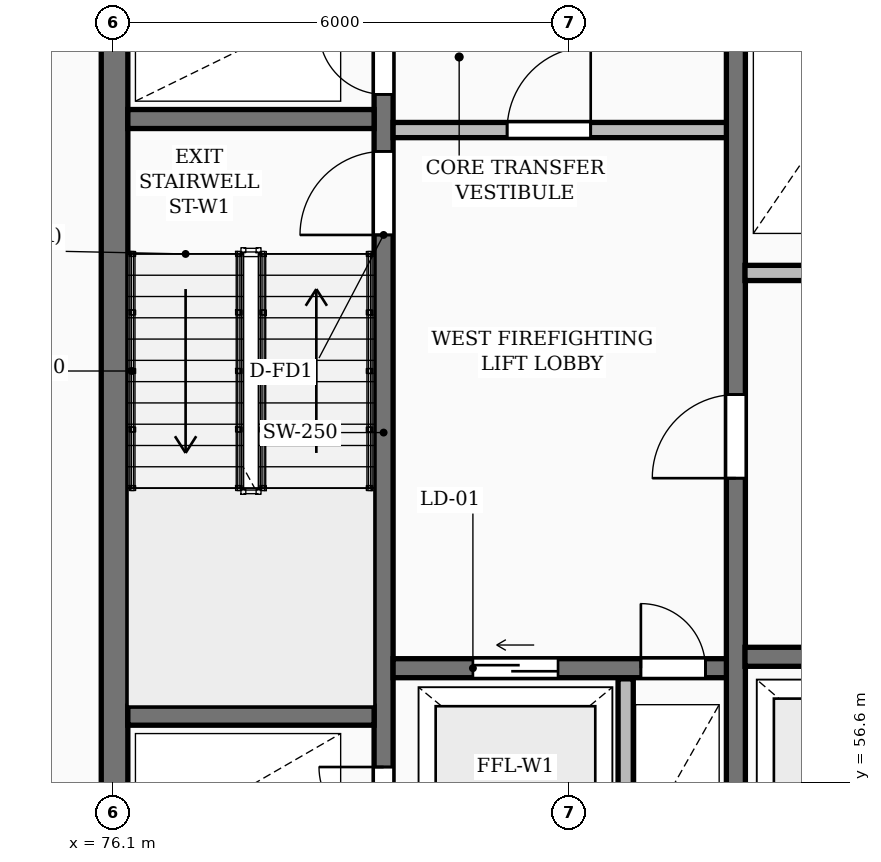
"""IFC4 building model, lengths in metres.
Left out: names, types, materials, properties, quantities, classifications, styles, units other than length and angle.
Written with IfcOpenShell. Run it as: python <this file> out.ifc"""

import sys

from ifc_helpers import new_model, si_unit, direction, frame, frame_2d, origin, place, context, subcontext, project, spatial, rectangle, extrude, element, fill, save


model = new_model("IFC4")
c1 = context("Model", 3, precision=1e-05, world=origin(), true_north=direction((0.0, 1.0)))
c2 = subcontext(c1, "Body", "Model", "MODEL_VIEW")
j1 = project(units=[si_unit("LENGTHUNIT", "METRE"), si_unit("PLANEANGLEUNIT", "RADIAN")], contexts=[c1])
p1 = place(None, origin())
s1 = spatial("IfcSite", under=j1, at=p1, CompositionType="ELEMENT")
p2 = place(p1, origin())
s2 = spatial("IfcBuilding", under=s1, at=p2, CompositionType="ELEMENT")
p3 = place(p2, frame((0.0, 0.0, 10.0)))
s3 = spatial("IfcBuildingStorey", under=s2, at=p3, CompositionType="ELEMENT", Elevation=10.0)
p4 = place(p3, frame((76.125, 55.375, 0.0), z_axis=(0.0, 0.0, 1.0), x_axis=(0.0, 1.0, 0.0)))
e1 = element("IfcWall", 1, at=p4, inside=s3, PredefinedType="SHEAR", context=c2, shape_type="SweptSolid", body=[
    extrude(rectangle(XDim=11.65, YDim=0.35, at=frame_2d((5.825, 0.0))), origin(), (0.0, 0.0, 1.0), 4.5),
])
p5 = place(p3, frame((79.665, 55.4, 0.0), z_axis=(0.0, 0.0, 1.0), x_axis=(0.0, 1.0, 0.0)))
e2 = element("IfcWall", 2, at=p5, inside=s3, PredefinedType="SHEAR", context=c2, shape_type="SweptSolid", body=[
    extrude(rectangle(XDim=11.6, YDim=0.25, at=frame_2d((5.8, 0.0))), origin(), (0.0, 0.0, 1.0), 4.5),
])
p6 = place(p5, frame((0.55, 0.0, 0.0)))
e3 = element("IfcOpeningElement", 3, at=p6, cuts=e2, PredefinedType="OPENING", context=c2, shape_type="SweptSolid", body=[
    extrude(rectangle(XDim=0.85, YDim=2.05, at=frame_2d((0.425, 1.025))), frame((0.0, 0.135, 0.0), z_axis=(0.0, -1.0, 0.0), x_axis=(1.0, 0.0, 0.0)), (0.0, 0.0, 1.0), 0.27),
])
p7 = place(p5, frame((8.4, 0.0, 0.0)))
e4 = element("IfcOpeningElement", 4, at=p7, cuts=e2, PredefinedType="OPENING", context=c2, shape_type="SweptSolid", body=[
    extrude(rectangle(XDim=1.1, YDim=2.1, at=frame_2d((0.55, 1.05))), frame((0.0, 0.135, 0.0), z_axis=(0.0, -1.0, 0.0), x_axis=(1.0, 0.0, 0.0)), (0.0, 0.0, 1.0), 0.27),
])
p8 = place(p5, frame((10.25, 0.0, 0.0)))
e5 = element("IfcOpeningElement", 5, at=p8, cuts=e2, PredefinedType="OPENING", context=c2, shape_type="SweptSolid", body=[
    extrude(rectangle(XDim=0.85, YDim=2.05, at=frame_2d((0.425, 1.025))), frame((0.0, 0.135, 0.0), z_axis=(0.0, -1.0, 0.0), x_axis=(1.0, 0.0, 0.0)), (0.0, 0.0, 1.0), 0.27),
])
for number, where, z_axis, x_axis in (
    (6, (76.3, 57.475, 0.0), (0.0, 0.0, 1.0), (1.0, 0.0, 0.0)),
    (7, (76.3, 65.325, 0.0), (0.0, 0.0, 1.0), (1.0, 0.0, 0.0)),
):
    element("IfcWall", number, at=place(p3, frame(where, z_axis=z_axis, x_axis=x_axis)), inside=s3, PredefinedType="SHEAR", context=c2, shape_type="SweptSolid", body=[
        extrude(rectangle(XDim=3.24, YDim=0.25, at=frame_2d((1.62, 0.0))), origin(), (0.0, 0.0, 1.0), 4.5),
    ])
p9 = place(p3, frame((79.79, 58.1, 0.0), z_axis=(0.0, 0.0, 1.0), x_axis=(1.0, 0.0, 0.0)))
e8 = element("IfcWall", 8, at=p9, inside=s3, PredefinedType="SHEAR", context=c2, shape_type="SweptSolid", body=[
    extrude(rectangle(XDim=4.39, YDim=0.25, at=frame_2d((2.195, 0.0))), origin(), (0.0, 0.0, 1.0), 4.5),
])
p10 = place(p9, frame((1.05, 0.0, 0.0)))
e9 = element("IfcOpeningElement", 9, at=p10, cuts=e8, PredefinedType="OPENING", context=c2, shape_type="SweptSolid", body=[
    extrude(rectangle(XDim=1.12, YDim=2.12, at=frame_2d((0.56, 1.06))), frame((0.0, 0.135, 0.0), z_axis=(0.0, -1.0, 0.0), x_axis=(1.0, 0.0, 0.0)), (0.0, 0.0, 1.0), 0.27),
])
p11 = place(p9, frame((3.26, 0.0, 0.0)))
e10 = element("IfcOpeningElement", 10, at=p11, cuts=e8, PredefinedType="OPENING", context=c2, shape_type="SweptSolid", body=[
    extrude(rectangle(XDim=0.85, YDim=2.05, at=frame_2d((0.425, 1.025))), frame((0.0, 0.135, 0.0), z_axis=(0.0, -1.0, 0.0), x_axis=(1.0, 0.0, 0.0)), (0.0, 0.0, 1.0), 0.27),
])
p12 = place(p3, frame((82.85, 55.4, 0.0), z_axis=(0.0, 0.0, 1.0), x_axis=(0.0, 1.0, 0.0)))
e11 = element("IfcWall", 11, at=p12, inside=s3, PredefinedType="PARTITIONING", context=c2, shape_type="SweptSolid", body=[
    extrude(rectangle(XDim=2.56, YDim=0.2, at=frame_2d((1.28, 0.0))), origin(), (0.0, 0.0, 1.0), 4.2),
])
p13 = place(p3, frame((79.79, 65.18, 0.0), z_axis=(0.0, 0.0, 1.0), x_axis=(1.0, 0.0, 0.0)))
e12 = element("IfcWall", 12, at=p13, inside=s3, PredefinedType="PARTITIONING", context=c2, shape_type="SweptSolid", body=[
    extrude(rectangle(XDim=4.39, YDim=0.2, at=frame_2d((2.195, 0.0))), origin(), (0.0, 0.0, 1.0), 4.2),
])
p14 = place(p13, frame((1.5, 0.0, 0.0)))
e13 = element("IfcOpeningElement", 13, at=p14, cuts=e12, PredefinedType="OPENING", context=c2, shape_type="SweptSolid", body=[
    extrude(rectangle(XDim=1.1, YDim=2.1, at=frame_2d((0.55, 1.05))), frame((0.0, 0.11, 0.0), z_axis=(0.0, -1.0, 0.0), x_axis=(1.0, 0.0, 0.0)), (0.0, 0.0, 1.0), 0.22),
])
p15 = place(p3, frame((84.3, 55.4, 0.0), z_axis=(0.0, 0.0, 1.0), x_axis=(0.0, 1.0, 0.0)))
e14 = element("IfcWall", 14, at=p15, inside=s3, PredefinedType="SHEAR", context=c2, shape_type="SweptSolid", body=[
    extrude(rectangle(XDim=11.6, YDim=0.25, at=frame_2d((5.8, 0.0))), origin(), (0.0, 0.0, 1.0), 4.5),
])
p16 = place(p15, frame((5.2, 0.0, 0.0)))
e15 = element("IfcOpeningElement", 15, at=p16, cuts=e14, PredefinedType="OPENING", context=c2, shape_type="SweptSolid", body=[
    extrude(rectangle(XDim=1.1, YDim=2.1, at=frame_2d((0.55, 1.05))), frame((0.0, 0.135, 0.0), z_axis=(0.0, -1.0, 0.0), x_axis=(1.0, 0.0, 0.0)), (0.0, 0.0, 1.0), 0.27),
])
p17 = place(p3, frame((84.42, 58.25, 0.0), z_axis=(0.0, 0.0, 1.0), x_axis=(1.0, 0.0, 0.0)))
e16 = element("IfcWall", 16, at=p17, inside=s3, PredefinedType="SHEAR", context=c2, shape_type="SweptSolid", body=[
    extrude(rectangle(XDim=8.36, YDim=0.25, at=frame_2d((4.18, 0.0))), origin(), (0.0, 0.0, 1.0), 4.5),
])
p18 = place(p17, frame((0.82, 0.0, 0.0)))
e17 = element("IfcOpeningElement", 17, at=p18, cuts=e16, PredefinedType="OPENING", context=c2, shape_type="SweptSolid", body=[
    extrude(rectangle(XDim=1.12, YDim=2.12, at=frame_2d((0.56, 1.06))), frame((0.0, 0.135, 0.0), z_axis=(0.0, -1.0, 0.0), x_axis=(1.0, 0.0, 0.0)), (0.0, 0.0, 1.0), 0.27),
])
p19 = place(p17, frame((3.62, 0.0, 0.0)))
e18 = element("IfcOpeningElement", 18, at=p19, cuts=e16, PredefinedType="OPENING", context=c2, shape_type="SweptSolid", body=[
    extrude(rectangle(XDim=1.12, YDim=2.12, at=frame_2d((0.56, 1.06))), frame((0.0, 0.135, 0.0), z_axis=(0.0, -1.0, 0.0), x_axis=(1.0, 0.0, 0.0)), (0.0, 0.0, 1.0), 0.27),
])
p20 = place(p17, frame((6.42, 0.0, 0.0)))
e19 = element("IfcOpeningElement", 19, at=p20, cuts=e16, PredefinedType="OPENING", context=c2, shape_type="SweptSolid", body=[
    extrude(rectangle(XDim=1.12, YDim=2.12, at=frame_2d((0.56, 1.06))), frame((0.0, 0.135, 0.0), z_axis=(0.0, -1.0, 0.0), x_axis=(1.0, 0.0, 0.0)), (0.0, 0.0, 1.0), 0.27),
])
p21 = place(p3, frame((84.42, 63.3, 0.0), z_axis=(0.0, 0.0, 1.0), x_axis=(1.0, 0.0, 0.0)))
e20 = element("IfcWall", 20, at=p21, inside=s3, PredefinedType="PARTITIONING", context=c2, shape_type="SweptSolid", body=[
    extrude(rectangle(XDim=19.83, YDim=0.2, at=frame_2d((9.915, 0.0))), origin(), (0.0, 0.0, 1.0), 4.2),
])
p22 = place(p21, frame((1.15, 0.0, 0.0)))
e21 = element("IfcOpeningElement", 21, at=p22, cuts=e20, PredefinedType="OPENING", context=c2, shape_type="SweptSolid", body=[
    extrude(rectangle(XDim=0.85, YDim=2.05, at=frame_2d((0.425, 1.025))), frame((0.0, 0.11, 0.0), z_axis=(0.0, -1.0, 0.0), x_axis=(1.0, 0.0, 0.0)), (0.0, 0.0, 1.0), 0.22),
])
p23 = place(p21, frame((3.25, 0.0, 0.0)))
e22 = element("IfcOpeningElement", 22, at=p23, cuts=e20, PredefinedType="OPENING", context=c2, shape_type="SweptSolid", body=[
    extrude(rectangle(XDim=0.85, YDim=2.05, at=frame_2d((0.425, 1.025))), frame((0.0, 0.11, 0.0), z_axis=(0.0, -1.0, 0.0), x_axis=(1.0, 0.0, 0.0)), (0.0, 0.0, 1.0), 0.22),
])
p24 = place(p21, frame((13.08, 0.0, 0.0)))
e23 = element("IfcOpeningElement", 23, at=p24, cuts=e20, PredefinedType="OPENING", context=c2, shape_type="SweptSolid", body=[
    extrude(rectangle(XDim=1.5, YDim=2.2, at=frame_2d((0.75, 1.1))), frame((0.0, 0.11, 0.0), z_axis=(0.0, -1.0, 0.0), x_axis=(1.0, 0.0, 0.0)), (0.0, 0.0, 1.0), 0.22),
])
p25 = place(p21, frame((6.68, 0.0, 0.0)))
e24 = element("IfcOpeningElement", 24, at=p25, cuts=e20, PredefinedType="OPENING", context=c2, shape_type="SweptSolid", body=[
    extrude(rectangle(XDim=0.92, YDim=2.08, at=frame_2d((0.46, 1.04))), frame((0.0, 0.11, 0.0), z_axis=(0.0, -1.0, 0.0), x_axis=(1.0, 0.0, 0.0)), (0.0, 0.0, 1.0), 0.22),
])
p26 = place(p21, frame((16.33, 0.0, 0.0)))
e25 = element("IfcOpeningElement", 25, at=p26, cuts=e20, PredefinedType="OPENING", context=c2, shape_type="SweptSolid", body=[
    extrude(rectangle(XDim=0.88, YDim=2.06, at=frame_2d((0.44, 1.03))), frame((0.0, 0.11, 0.0), z_axis=(0.0, -1.0, 0.0), x_axis=(1.0, 0.0, 0.0)), (0.0, 0.0, 1.0), 0.22),
])
p27 = place(p6, origin())
e26 = element("IfcDoor", 26, at=p27, inside=s3, OperationType="SINGLE_SWING_RIGHT", PredefinedType="DOOR", context=c2, shape_type="SweptSolid", body=[
    extrude(rectangle(XDim=0.85, YDim=2.05, at=frame_2d((0.425, 1.025))), frame((0.0, 0.025, 0.0), z_axis=(0.0, -1.0, 0.0), x_axis=(1.0, 0.0, 0.0)), (0.0, 0.0, 1.0), 0.05),
])
fill(e3, e26)
p28 = place(p7, origin())
e27 = element("IfcDoor", 27, at=p28, inside=s3, OperationType="SINGLE_SWING_LEFT", PredefinedType="DOOR", context=c2, shape_type="SweptSolid", body=[
    extrude(rectangle(XDim=1.1, YDim=2.1, at=frame_2d((0.55, 1.05))), frame((0.0, 0.025, 0.0), z_axis=(0.0, -1.0, 0.0), x_axis=(1.0, 0.0, 0.0)), (0.0, 0.0, 1.0), 0.05),
])
fill(e4, e27)
p29 = place(p8, origin())
e28 = element("IfcDoor", 28, at=p29, inside=s3, OperationType="SINGLE_SWING_RIGHT", PredefinedType="DOOR", context=c2, shape_type="SweptSolid", body=[
    extrude(rectangle(XDim=0.85, YDim=2.05, at=frame_2d((0.425, 1.025))), frame((0.0, 0.025, 0.0), z_axis=(0.0, -1.0, 0.0), x_axis=(1.0, 0.0, 0.0)), (0.0, 0.0, 1.0), 0.05),
])
fill(e5, e28)
p30 = place(p10, origin())
e29 = element("IfcDoor", 29, at=p30, inside=s3, OperationType="SLIDING_TO_LEFT", PredefinedType="DOOR", context=c2, shape_type="SweptSolid", body=[
    extrude(rectangle(XDim=1.12, YDim=2.12, at=frame_2d((0.56, 1.06))), frame((0.0, 0.025, 0.0), z_axis=(0.0, -1.0, 0.0), x_axis=(1.0, 0.0, 0.0)), (0.0, 0.0, 1.0), 0.05),
])
fill(e9, e29)
p31 = place(p11, origin())
e30 = element("IfcDoor", 30, at=p31, inside=s3, OperationType="SINGLE_SWING_LEFT", PredefinedType="DOOR", context=c2, shape_type="SweptSolid", body=[
    extrude(rectangle(XDim=0.85, YDim=2.05, at=frame_2d((0.425, 1.025))), frame((0.0, 0.025, 0.0), z_axis=(0.0, -1.0, 0.0), x_axis=(1.0, 0.0, 0.0)), (0.0, 0.0, 1.0), 0.05),
])
fill(e10, e30)
p32 = place(p14, origin())
e31 = element("IfcDoor", 31, at=p32, inside=s3, OperationType="SINGLE_SWING_RIGHT", PredefinedType="DOOR", context=c2, shape_type="SweptSolid", body=[
    extrude(rectangle(XDim=1.1, YDim=2.1, at=frame_2d((0.55, 1.05))), frame((0.0, 0.025, 0.0), z_axis=(0.0, -1.0, 0.0), x_axis=(1.0, 0.0, 0.0)), (0.0, 0.0, 1.0), 0.05),
])
fill(e13, e31)
p33 = place(p16, origin())
e32 = element("IfcDoor", 32, at=p33, inside=s3, OperationType="SINGLE_SWING_LEFT", PredefinedType="DOOR", context=c2, shape_type="SweptSolid", body=[
    extrude(rectangle(XDim=1.1, YDim=2.1, at=frame_2d((0.55, 1.05))), frame((0.0, 0.025, 0.0), z_axis=(0.0, -1.0, 0.0), x_axis=(1.0, 0.0, 0.0)), (0.0, 0.0, 1.0), 0.05),
])
fill(e15, e32)
save(model, sys.argv[1])
